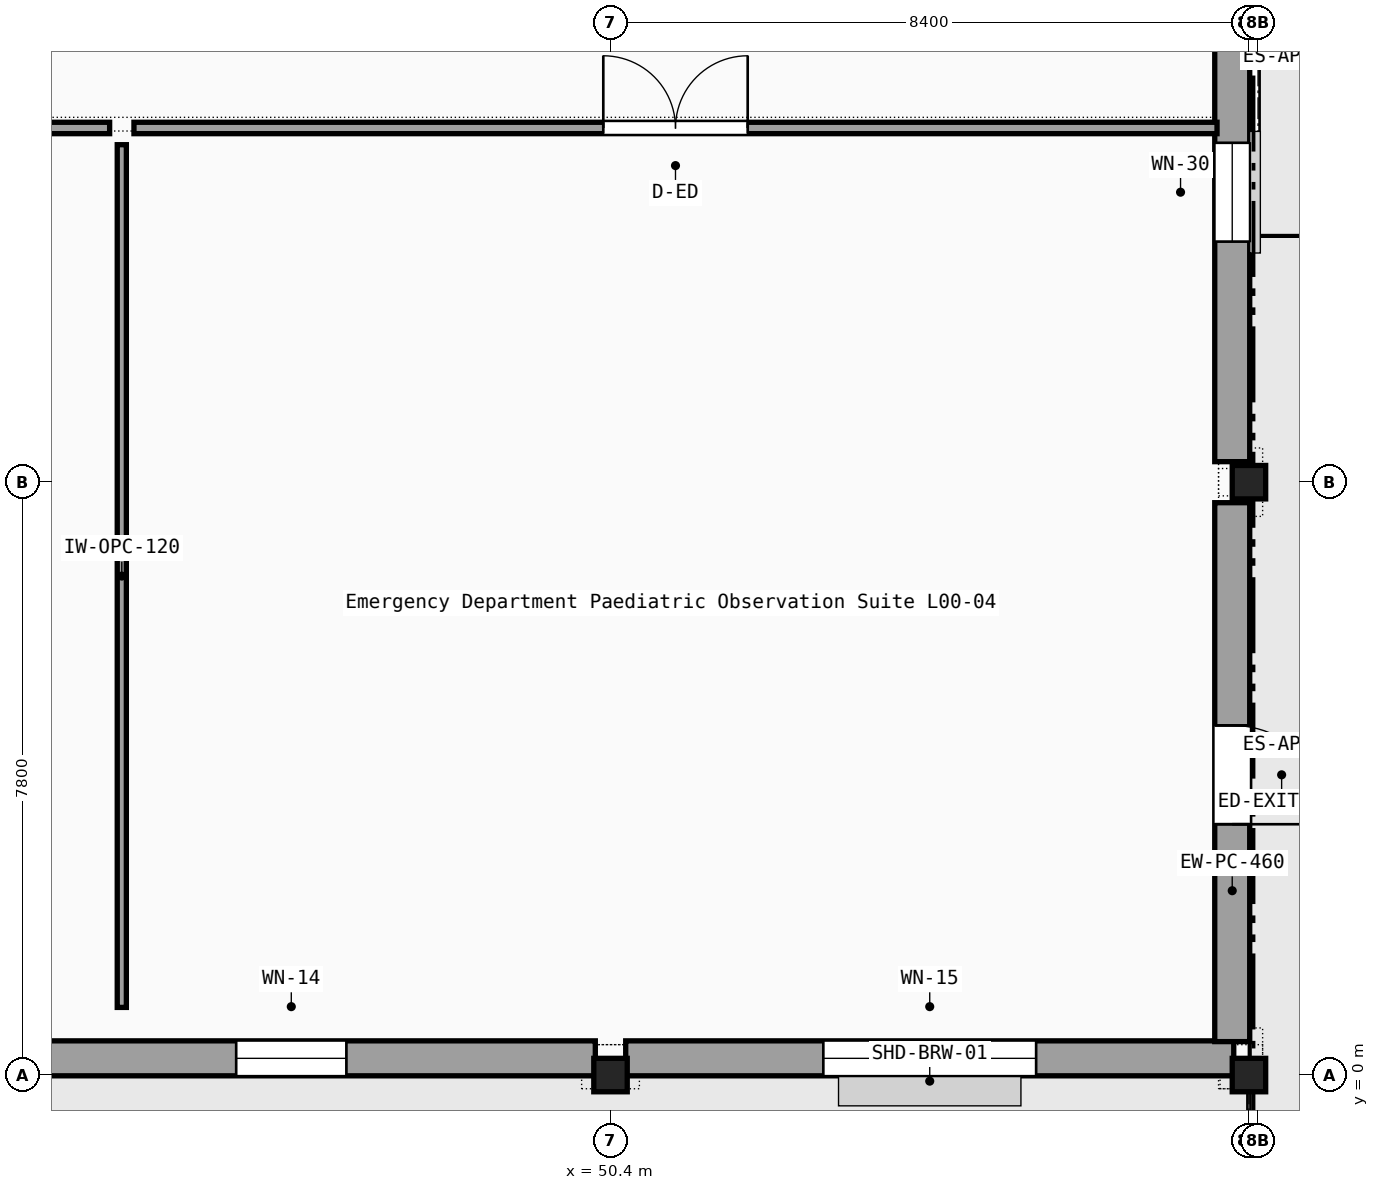
"""IFC4 building model, lengths in metres.
Left out: names, types, materials, properties, quantities, classifications, styles, units other than length and angle.
Written with IfcOpenShell. Run it as: python <this file> out.ifc"""

import sys

from ifc_helpers import new_model, si_unit, direction, frame, frame_2d, origin, origin_2d, place, context, subcontext, project, spatial, rectangle, i_section, extrude, element, fill, save


model = new_model("IFC4")
c1 = context("Model", 3, precision=1e-05, world=origin(), true_north=direction((0.0, 1.0)))
c2 = subcontext(c1, "Body", "Model", "MODEL_VIEW")
j1 = project(units=[si_unit("LENGTHUNIT", "METRE"), si_unit("PLANEANGLEUNIT", "RADIAN")], contexts=[c1])
p1 = place(None, origin())
s1 = spatial("IfcSite", under=j1, at=p1, CompositionType="ELEMENT")
p2 = place(p1, origin())
s2 = spatial("IfcBuilding", under=s1, at=p2, CompositionType="ELEMENT")
p3 = place(p2, origin())
s3 = spatial("IfcBuildingStorey", under=s2, at=p3, CompositionType="ELEMENT", Elevation=0.0)
for number, where, z_axis, x_axis in (
    (1, (50.4, 0.0, 0.0), (0.0, 0.0, 1.0), (1.0, 0.0, 0.0)),
    (2, (58.8, 0.0, 0.0), (0.0, 0.0, 1.0), (1.0, 0.0, 0.0)),
    (3, (58.8, 7.8, 0.0), (0.0, 0.0, 1.0), (1.0, 0.0, 0.0)),
):
    element("IfcColumn", number, at=place(p3, frame(where, z_axis=z_axis, x_axis=x_axis)), inside=s3, PredefinedType="COLUMN", context=c2, shape_type="SweptSolid", body=[
        extrude(i_section(OverallWidth=0.3, OverallDepth=0.44, WebThickness=0.011, FlangeThickness=0.021, FilletRadius=0.027, at=origin_2d()), origin(), (0.0, 0.0, 1.0), 5.1),
    ])
p4 = place(p3, frame((42.2, 0.22, 0.0), z_axis=(0.0, 0.0, 1.0), x_axis=(1.0, 0.0, 0.0)))
e4 = element("IfcWall", 4, at=p4, inside=s3, PredefinedType="SOLIDWALL", context=c2, shape_type="SweptSolid", body=[
    extrude(rectangle(XDim=8.0, YDim=0.46, at=frame_2d((4.0, 0.0))), origin(), (0.0, 0.0, 1.0), 4.44),
])
p5 = place(p4, frame((3.275, 0.0, 0.85)))
e5 = element("IfcOpeningElement", 5, at=p5, cuts=e4, PredefinedType="OPENING", context=c2, shape_type="SweptSolid", body=[
    extrude(rectangle(XDim=1.45, YDim=1.65, at=frame_2d((0.725, 0.825))), frame((0.0, 0.24, 0.0), z_axis=(0.0, -1.0, 0.0), x_axis=(1.0, 0.0, 0.0)), (0.0, 0.0, 1.0), 0.48),
])
p6 = place(p3, frame((50.6, 0.22, 0.0), z_axis=(0.0, 0.0, 1.0), x_axis=(1.0, 0.0, 0.0)))
e6 = element("IfcWall", 6, at=p6, inside=s3, PredefinedType="SOLIDWALL", context=c2, shape_type="SweptSolid", body=[
    extrude(rectangle(XDim=8.0, YDim=0.46, at=frame_2d((4.0, 0.0))), origin(), (0.0, 0.0, 1.0), 4.44),
])
p7 = place(p6, frame((2.6, 0.0, 0.75)))
e7 = element("IfcOpeningElement", 7, at=p7, cuts=e6, PredefinedType="OPENING", context=c2, shape_type="SweptSolid", body=[
    extrude(rectangle(XDim=2.8, YDim=1.75, at=frame_2d((1.4, 0.875))), frame((0.0, 0.24, 0.0), z_axis=(0.0, -1.0, 0.0), x_axis=(1.0, 0.0, 0.0)), (0.0, 0.0, 1.0), 0.48),
])
p8 = place(p3, frame((58.58, 0.44, 0.0), z_axis=(0.0, 0.0, 1.0), x_axis=(0.0, 1.0, 0.0)))
e8 = element("IfcWall", 8, at=p8, inside=s3, PredefinedType="SOLIDWALL", context=c2, shape_type="SweptSolid", body=[
    extrude(rectangle(XDim=7.09, YDim=0.46, at=frame_2d((3.545, 0.0))), origin(), (0.0, 0.0, 1.0), 4.44),
])
p9 = place(p8, frame((2.86, 0.0, 0.0)))
e9 = element("IfcOpeningElement", 9, at=p9, cuts=e8, PredefinedType="OPENING", context=c2, shape_type="SweptSolid", body=[
    extrude(rectangle(XDim=1.3, YDim=2.2, at=frame_2d((0.65, 1.1))), frame((0.0, 0.24, 0.0), z_axis=(0.0, -1.0, 0.0), x_axis=(1.0, 0.0, 0.0)), (0.0, 0.0, 1.0), 0.48),
])
p10 = place(p3, frame((58.58, 8.07, 0.0), z_axis=(0.0, 0.0, 1.0), x_axis=(0.0, 1.0, 0.0)))
e10 = element("IfcWall", 10, at=p10, inside=s3, PredefinedType="SOLIDWALL", context=c2, shape_type="SweptSolid", body=[
    extrude(rectangle(XDim=7.09, YDim=0.46, at=frame_2d((3.545, 0.0))), origin(), (0.0, 0.0, 1.0), 4.44),
])
p11 = place(p10, frame((2.895, 0.0, 0.9)))
e11 = element("IfcOpeningElement", 11, at=p11, cuts=e10, PredefinedType="OPENING", context=c2, shape_type="SweptSolid", body=[
    extrude(rectangle(XDim=1.3, YDim=1.6, at=frame_2d((0.65, 0.8))), frame((0.0, 0.24, 0.0), z_axis=(0.0, -1.0, 0.0), x_axis=(1.0, 0.0, 0.0)), (0.0, 0.0, 1.0), 0.48),
])
p12 = place(p3, frame((29.56, 12.46, 0.0), z_axis=(0.0, 0.0, 1.0), x_axis=(1.0, 0.0, 0.0)))
e12 = element("IfcWall", 12, at=p12, inside=s3, PredefinedType="PARTITIONING", context=c2, shape_type="SweptSolid", body=[
    extrude(rectangle(XDim=14.25, YDim=0.15, at=frame_2d((7.125, 0.0))), origin(), (0.0, 0.0, 1.0), 4.43),
])
p13 = place(p12, frame((6.175, 0.0, 0.0)))
e13 = element("IfcOpeningElement", 13, at=p13, cuts=e12, PredefinedType="OPENING", context=c2, shape_type="SweptSolid", body=[
    extrude(rectangle(XDim=1.9, YDim=2.35, at=frame_2d((0.95, 1.175))), frame((0.0, 0.085, 0.0), z_axis=(0.0, -1.0, 0.0), x_axis=(1.0, 0.0, 0.0)), (0.0, 0.0, 1.0), 0.17),
])
p14 = place(p3, frame((43.97, 0.89, 0.0), z_axis=(0.0, 0.0, 1.0), x_axis=(0.0, 1.0, 0.0)))
e14 = element("IfcWall", 14, at=p14, inside=s3, PredefinedType="PARTITIONING", context=c2, shape_type="SweptSolid", body=[
    extrude(rectangle(XDim=11.35, YDim=0.12, at=frame_2d((5.675, 0.0))), origin(), (0.0, 0.0, 1.0), 4.82),
])
p15 = place(p3, frame((44.13, 12.46, 0.0), z_axis=(0.0, 0.0, 1.0), x_axis=(1.0, 0.0, 0.0)))
e15 = element("IfcWall", 15, at=p15, inside=s3, PredefinedType="PARTITIONING", context=c2, shape_type="SweptSolid", body=[
    extrude(rectangle(XDim=14.25, YDim=0.15, at=frame_2d((7.125, 0.0))), origin(), (0.0, 0.0, 1.0), 4.82),
])
p16 = place(p15, frame((6.175, 0.0, 0.0)))
e16 = element("IfcOpeningElement", 16, at=p16, cuts=e15, PredefinedType="OPENING", context=c2, shape_type="SweptSolid", body=[
    extrude(rectangle(XDim=1.9, YDim=2.35, at=frame_2d((0.95, 1.175))), frame((0.0, 0.085, 0.0), z_axis=(0.0, -1.0, 0.0), x_axis=(1.0, 0.0, 0.0)), (0.0, 0.0, 1.0), 0.17),
])
p17 = place(p5, origin())
e17 = element("IfcWindow", 17, at=p17, inside=s3, PartitioningType="SINGLE_PANEL", PredefinedType="WINDOW", context=c2, shape_type="SweptSolid", body=[
    extrude(rectangle(XDim=1.45, YDim=1.65, at=frame_2d((0.725, 0.825))), frame((0.0, 0.03, 0.0), z_axis=(0.0, -1.0, 0.0), x_axis=(1.0, 0.0, 0.0)), (0.0, 0.0, 1.0), 0.06),
])
fill(e5, e17)
p18 = place(p7, origin())
e18 = element("IfcWindow", 18, at=p18, inside=s3, PartitioningType="SINGLE_PANEL", PredefinedType="WINDOW", context=c2, shape_type="SweptSolid", body=[
    extrude(rectangle(XDim=2.8, YDim=1.75, at=frame_2d((1.4, 0.875))), frame((0.0, 0.03, 0.0), z_axis=(0.0, -1.0, 0.0), x_axis=(1.0, 0.0, 0.0)), (0.0, 0.0, 1.0), 0.06),
])
fill(e7, e18)
p19 = place(p11, origin())
e19 = element("IfcWindow", 19, at=p19, inside=s3, PartitioningType="SINGLE_PANEL", PredefinedType="WINDOW", context=c2, shape_type="SweptSolid", body=[
    extrude(rectangle(XDim=1.3, YDim=1.6, at=frame_2d((0.65, 0.8))), frame((0.0, 0.03, 0.0), z_axis=(0.0, -1.0, 0.0), x_axis=(1.0, 0.0, 0.0)), (0.0, 0.0, 1.0), 0.06),
])
fill(e11, e19)
p20 = place(p9, frame((1.3, 0.0, 0.0), z_axis=(0.0, 0.0, 1.0), x_axis=(-1.0, 0.0, 0.0)))
e20 = element("IfcDoor", 20, at=p20, inside=s3, OperationType="SINGLE_SWING_LEFT", PredefinedType="DOOR", context=c2, shape_type="SweptSolid", body=[
    extrude(rectangle(XDim=1.3, YDim=2.2, at=frame_2d((0.65, 1.1))), frame((0.0, 0.025, 0.0), z_axis=(0.0, -1.0, 0.0), x_axis=(1.0, 0.0, 0.0)), (0.0, 0.0, 1.0), 0.05),
])
fill(e9, e20)
p21 = place(p16, origin())
e21 = element("IfcDoor", 21, at=p21, inside=s3, OperationType="DOUBLE_DOOR_SINGLE_SWING", PredefinedType="DOOR", context=c2, shape_type="SweptSolid", body=[
    extrude(rectangle(XDim=1.9, YDim=2.35, at=frame_2d((0.95, 1.175))), frame((0.0, 0.025, 0.0), z_axis=(0.0, -1.0, 0.0), x_axis=(1.0, 0.0, 0.0)), (0.0, 0.0, 1.0), 0.05),
])
fill(e16, e21)
save(model, sys.argv[1])
